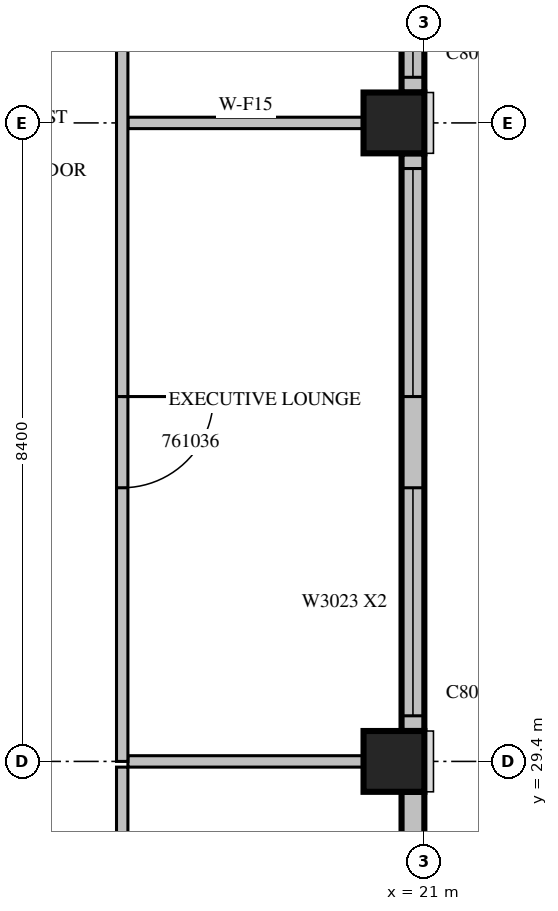
"""IFC4 building model, lengths in metres.
Left out: names, types, materials, properties, quantities, classifications, styles, units other than length and angle.
Written with IfcOpenShell. Run it as: python <this file> out.ifc"""

import sys

from ifc_helpers import new_model, si_unit, direction, frame, frame_2d, origin, origin_2d, place, context, subcontext, project, spatial, rectangle, extrude, source, transform, mapped, element, fill, save


model = new_model("IFC4")
c1 = context("Model", 3, precision=1e-05, world=origin(), true_north=direction((0.0, 1.0)))
c2 = subcontext(c1, "Body", "Model", "MODEL_VIEW")
j1 = project(units=[si_unit("LENGTHUNIT", "METRE"), si_unit("PLANEANGLEUNIT", "RADIAN")], contexts=[c1])
p1 = place(None, origin())
s1 = spatial("IfcSite", under=j1, at=p1, CompositionType="ELEMENT")
p2 = place(p1, origin())
s2 = spatial("IfcBuilding", under=s1, at=p2, CompositionType="ELEMENT")
p3 = place(p2, frame((0.0, 0.0, 265.2)))
s3 = spatial("IfcBuildingStorey", under=s2, at=p3, CompositionType="ELEMENT", Elevation=265.2)
m1 = source(origin(), c2, "Body", "SweptSolid", [
    extrude(rectangle(XDim=0.8, YDim=0.8, at=origin_2d()), origin(), (0.0, 0.0, 1.0), 3.8),
])
for number, where, z_axis, x_axis in (
    (1, (20.6, 29.4, 0.0), (0.0, 0.0, 1.0), (1.0, 0.0, 0.0)),
    (2, (20.6, 37.8, 0.0), (0.0, 0.0, 1.0), (1.0, 0.0, 0.0)),
):
    element("IfcColumn", number, at=place(p3, frame(where, z_axis=z_axis, x_axis=x_axis)), inside=s3, PredefinedType="COLUMN", context=c2, shape_type="MappedRepresentation", body=[
        mapped(m1, transform((0.0, 0.0, 0.0), scale=1.0)),
    ])
m2 = source(origin(), c2, "Body", "SweptSolid", [
    extrude(rectangle(XDim=7.2, YDim=0.3, at=frame_2d((3.6, 0.0))), origin(), (0.0, 0.0, 1.0), 3.4),
])
p4 = place(p3, frame((20.85, 21.8, 0.0), z_axis=(0.0, 0.0, 1.0), x_axis=(0.0, 1.0, 0.0)))
e3 = element("IfcWall", 3, at=p4, inside=s3, PredefinedType="STANDARD", context=c2, shape_type="MappedRepresentation", body=[
    mapped(m2, transform((0.0, 0.0, 0.0), scale=1.0)),
])
m3 = source(origin(), c2, "Body", "SweptSolid", [
    extrude(rectangle(XDim=1.8, YDim=2.3, at=frame_2d((0.9, 1.15))), frame((0.0, 0.16, 0.0), z_axis=(0.0, -1.0, 0.0), x_axis=(1.0, 0.0, 0.0)), (0.0, 0.0, 1.0), 0.32),
])
p5 = place(p4, frame((0.4, 0.0, 0.6)))
e4 = element("IfcOpeningElement", 4, at=p5, cuts=e3, PredefinedType="OPENING", context=c2, shape_type="MappedRepresentation", body=[
    mapped(m3, transform((0.0, 0.0, 0.0), scale=1.0)),
])
p6 = place(p4, frame((4.787, 0.0, 0.6)))
e5 = element("IfcOpeningElement", 5, at=p6, cuts=e3, PredefinedType="OPENING", context=c2, shape_type="MappedRepresentation", body=[
    mapped(m3, transform((0.0, 0.0, 0.0), scale=1.0)),
])
m4 = source(origin(), c2, "Body", "SweptSolid", [
    extrude(rectangle(XDim=7.6, YDim=0.3, at=frame_2d((3.8, 0.0))), origin(), (0.0, 0.0, 1.0), 3.4),
])
p7 = place(p3, frame((20.85, 29.8, 0.0), z_axis=(0.0, 0.0, 1.0), x_axis=(0.0, 1.0, 0.0)))
e6 = element("IfcWall", 6, at=p7, inside=s3, PredefinedType="STANDARD", context=c2, shape_type="MappedRepresentation", body=[
    mapped(m4, transform((0.0, 0.0, 0.0), scale=1.0)),
])
m5 = source(origin(), c2, "Body", "SweptSolid", [
    extrude(rectangle(XDim=3.0, YDim=2.3, at=frame_2d((1.5, 1.15))), frame((0.0, 0.16, 0.0), z_axis=(0.0, -1.0, 0.0), x_axis=(1.0, 0.0, 0.0)), (0.0, 0.0, 1.0), 0.32),
])
p8 = place(p7, frame((0.2, 0.0, 0.6)))
e7 = element("IfcOpeningElement", 7, at=p8, cuts=e6, PredefinedType="OPENING", context=c2, shape_type="MappedRepresentation", body=[
    mapped(m5, transform((0.0, 0.0, 0.0), scale=1.0)),
])
p9 = place(p7, frame((4.4, 0.0, 0.6)))
e8 = element("IfcOpeningElement", 8, at=p9, cuts=e6, PredefinedType="OPENING", context=c2, shape_type="MappedRepresentation", body=[
    mapped(m5, transform((0.0, 0.0, 0.0), scale=1.0)),
])
p10 = place(p3, frame((20.85, 38.2, 0.0), z_axis=(0.0, 0.0, 1.0), x_axis=(0.0, 1.0, 0.0)))
e9 = element("IfcWall", 9, at=p10, inside=s3, PredefinedType="STANDARD", context=c2, shape_type="MappedRepresentation", body=[
    mapped(m4, transform((0.0, 0.0, 0.0), scale=1.0)),
])
p11 = place(p10, frame((0.2, 0.0, 0.6)))
e10 = element("IfcOpeningElement", 10, at=p11, cuts=e9, PredefinedType="OPENING", context=c2, shape_type="MappedRepresentation", body=[
    mapped(m5, transform((0.0, 0.0, 0.0), scale=1.0)),
])
p12 = place(p10, frame((4.4, 0.0, 0.6)))
e11 = element("IfcOpeningElement", 11, at=p12, cuts=e9, PredefinedType="OPENING", context=c2, shape_type="MappedRepresentation", body=[
    mapped(m5, transform((0.0, 0.0, 0.0), scale=1.0)),
])
m6 = source(origin(), c2, "Body", "SweptSolid", [
    extrude(rectangle(XDim=3.25, YDim=0.15, at=frame_2d((1.625, 0.0))), origin(), (0.0, 0.0, 1.0), 3.4),
])
p13 = place(p3, frame((17.025, 29.325, 0.0), z_axis=(0.0, 0.0, 1.0), x_axis=(0.0, -1.0, 0.0)))
e12 = element("IfcWall", 12, at=p13, inside=s3, PredefinedType="PARTITIONING", context=c2, shape_type="MappedRepresentation", body=[
    mapped(m6, transform((0.0, 0.0, 0.0), scale=1.0)),
])
m7 = source(origin(), c2, "Body", "SweptSolid", [
    extrude(rectangle(XDim=3.101, YDim=0.15, at=frame_2d((1.55, 0.0))), origin(), (0.0, 0.0, 1.0), 3.4),
])
for number, where, z_axis, x_axis in (
    (13, (20.201, 29.4, 0.0), (0.0, 0.0, 1.0), (-1.0, 0.0, 0.0)),
    (14, (20.201, 37.8, 0.0), (0.0, 0.0, 1.0), (-1.0, 0.0, 0.0)),
):
    element("IfcWall", number, at=place(p3, frame(where, z_axis=z_axis, x_axis=x_axis)), inside=s3, PredefinedType="PARTITIONING", context=c2, shape_type="MappedRepresentation", body=[
        mapped(m7, transform((0.0, 0.0, 0.0), scale=1.0)),
    ])
m8 = source(origin(), c2, "Body", "SweptSolid", [
    extrude(rectangle(XDim=19.86, YDim=0.15, at=frame_2d((9.93, 0.0))), origin(), (0.0, 0.0, 1.0), 3.4),
])
p14 = place(p3, frame((17.025, 49.26, 0.0), z_axis=(0.0, 0.0, 1.0), x_axis=(0.0, -1.0, 0.0)))
e15 = element("IfcWall", 15, at=p14, inside=s3, PredefinedType="PARTITIONING", context=c2, shape_type="MappedRepresentation", body=[
    mapped(m8, transform((0.0, 0.0, 0.0), scale=1.0)),
])
m9 = source(origin(), c2, "Body", "SweptSolid", [
    extrude(rectangle(XDim=1.2, YDim=2.1, at=frame_2d((0.6, 1.05))), frame((0.0, 0.085, 0.0), z_axis=(0.0, -1.0, 0.0), x_axis=(1.0, 0.0, 0.0)), (0.0, 0.0, 1.0), 0.17),
])
p15 = place(p14, frame((15.06, 0.0, 0.0)))
e16 = element("IfcOpeningElement", 16, at=p15, cuts=e15, PredefinedType="OPENING", context=c2, shape_type="MappedRepresentation", body=[
    mapped(m9, transform((0.0, 0.0, 0.0), scale=1.0)),
])
m10 = source(origin(), c2, "Body", "SweptSolid", [
    extrude(rectangle(XDim=1.0, YDim=2.1, at=frame_2d((0.5, 1.05))), frame((0.0, 0.085, 0.0), z_axis=(0.0, -1.0, 0.0), x_axis=(1.0, 0.0, 0.0)), (0.0, 0.0, 1.0), 0.17),
])
p16 = place(p14, frame((6.63, 0.0, 0.0)))
e17 = element("IfcOpeningElement", 17, at=p16, cuts=e15, PredefinedType="OPENING", context=c2, shape_type="MappedRepresentation", body=[
    mapped(m10, transform((0.0, 0.0, 0.0), scale=1.0)),
])
m11 = source(origin(), c2, "Body", "SweptSolid", [
    extrude(rectangle(XDim=3.0, YDim=2.3, at=frame_2d((1.5, 1.15))), frame((0.0, 0.03, 0.0), z_axis=(0.0, -1.0, 0.0), x_axis=(1.0, 0.0, 0.0)), (0.0, 0.0, 1.0), 0.06),
])
p17 = place(p8, origin())
e18 = element("IfcWindow", 18, at=p17, inside=s3, PartitioningType="SINGLE_PANEL", PredefinedType="WINDOW", context=c2, shape_type="MappedRepresentation", body=[
    mapped(m11, transform((0.0, 0.0, 0.0), scale=1.0)),
])
fill(e7, e18)
p18 = place(p9, origin())
e19 = element("IfcWindow", 19, at=p18, inside=s3, PartitioningType="SINGLE_PANEL", PredefinedType="WINDOW", context=c2, shape_type="MappedRepresentation", body=[
    mapped(m11, transform((0.0, 0.0, 0.0), scale=1.0)),
])
fill(e8, e19)
p19 = place(p11, origin())
e20 = element("IfcWindow", 20, at=p19, inside=s3, PartitioningType="SINGLE_PANEL", PredefinedType="WINDOW", context=c2, shape_type="MappedRepresentation", body=[
    mapped(m11, transform((0.0, 0.0, 0.0), scale=1.0)),
])
fill(e10, e20)
m12 = source(origin(), c2, "Body", "SweptSolid", [
    extrude(rectangle(XDim=1.2, YDim=2.1, at=frame_2d((0.6, 1.05))), frame((0.0, 0.025, 0.0), z_axis=(0.0, -1.0, 0.0), x_axis=(1.0, 0.0, 0.0)), (0.0, 0.0, 1.0), 0.05),
])
p20 = place(p15, origin())
e21 = element("IfcDoor", 21, at=p20, inside=s3, OperationType="SINGLE_SWING_LEFT", PredefinedType="DOOR", context=c2, shape_type="MappedRepresentation", body=[
    mapped(m12, transform((0.0, 0.0, 0.0), scale=1.0)),
])
fill(e16, e21)
save(model, sys.argv[1])
